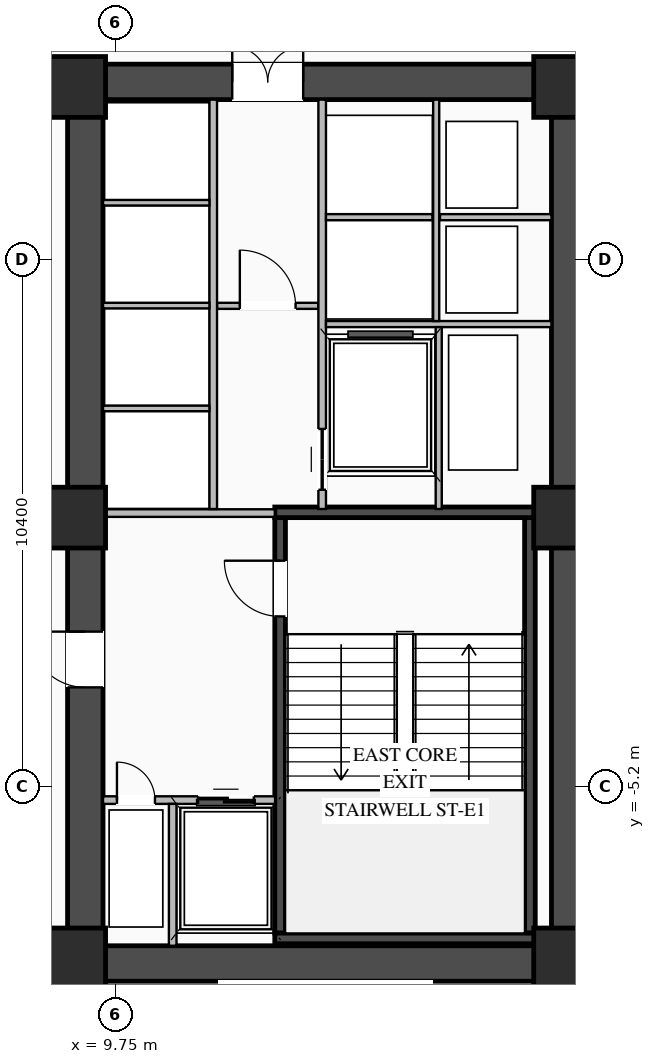
"""IFC4 building model, lengths in metres.
Left out: names, types, materials, properties, quantities, classifications, styles, units other than length and angle.
Written with IfcOpenShell. Run it as: python <this file> out.ifc"""

import sys

from ifc_helpers import new_model, si_unit, direction, frame, frame_2d, origin, origin_2d, place, context, subcontext, project, spatial, rectangle, extrude, element, fill, save


model = new_model("IFC4")
c1 = context("Model", 3, precision=1e-05, world=origin(), true_north=direction((0.0, 1.0)))
c2 = subcontext(c1, "Body", "Model", "MODEL_VIEW")
j1 = project(units=[si_unit("LENGTHUNIT", "METRE"), si_unit("PLANEANGLEUNIT", "RADIAN")], contexts=[c1])
p1 = place(None, origin())
s1 = spatial("IfcSite", under=j1, at=p1, CompositionType="ELEMENT")
p2 = place(p1, origin())
s2 = spatial("IfcBuilding", under=s1, at=p2, CompositionType="ELEMENT")
p3 = place(p2, frame((0.0, 0.0, 5.1)))
s3 = spatial("IfcBuildingStorey", under=s2, at=p3, CompositionType="ELEMENT", Elevation=5.1)
p4 = place(p3, frame((8.8, -8.7, 0.0), z_axis=(0.0, 0.0, 1.0), x_axis=(1.0, 0.0, 0.0)))
e1 = element("IfcWall", 1, at=p4, inside=s3, PredefinedType="SHEAR", context=c2, shape_type="SweptSolid", body=[
    extrude(rectangle(XDim=10.25, YDim=0.7, at=frame_2d((5.125, 0.0))), origin(), (0.0, 0.0, 1.0), 4.25),
])
p5 = place(p3, frame((8.8, 8.7, 0.0), z_axis=(0.0, 0.0, 1.0), x_axis=(1.0, 0.0, 0.0)))
e2 = element("IfcWall", 2, at=p5, inside=s3, PredefinedType="SHEAR", context=c2, shape_type="SweptSolid", body=[
    extrude(rectangle(XDim=10.25, YDim=0.7, at=frame_2d((5.125, 0.0))), origin(), (0.0, 0.0, 1.0), 4.25),
])
p6 = place(p5, frame((3.25, 0.0, 0.0)))
e3 = element("IfcOpeningElement", 3, at=p6, cuts=e2, PredefinedType="OPENING", context=c2, shape_type="SweptSolid", body=[
    extrude(rectangle(XDim=1.4, YDim=2.05, at=frame_2d((0.7, 1.025))), frame((0.0, 0.36, 0.0), z_axis=(0.0, -1.0, 0.0), x_axis=(1.0, 0.0, 0.0)), (0.0, 0.0, 1.0), 0.72),
])
p7 = place(p3, frame((9.15, -8.35, 0.0), z_axis=(0.0, 0.0, 1.0), x_axis=(0.0, 1.0, 0.0)))
e4 = element("IfcWall", 4, at=p7, inside=s3, PredefinedType="SHEAR", context=c2, shape_type="SweptSolid", body=[
    extrude(rectangle(XDim=16.7, YDim=0.7, at=frame_2d((8.35, 0.0))), origin(), (0.0, 0.0, 1.0), 4.25),
])
p8 = place(p7, frame((5.1, 0.0, 0.0)))
e5 = element("IfcOpeningElement", 5, at=p8, cuts=e4, PredefinedType="OPENING", context=c2, shape_type="SweptSolid", body=[
    extrude(rectangle(XDim=1.1, YDim=2.08, at=frame_2d((0.55, 1.04))), frame((0.0, 0.36, 0.0), z_axis=(0.0, -1.0, 0.0), x_axis=(1.0, 0.0, 0.0)), (0.0, 0.0, 1.0), 0.72),
])
p9 = place(p3, frame((18.7, -8.35, 0.0), z_axis=(0.0, 0.0, 1.0), x_axis=(0.0, 1.0, 0.0)))
e6 = element("IfcWall", 6, at=p9, inside=s3, PredefinedType="SHEAR", context=c2, shape_type="SweptSolid", body=[
    extrude(rectangle(XDim=16.7, YDim=0.7, at=frame_2d((8.35, 0.0))), origin(), (0.0, 0.0, 1.0), 4.25),
])
p10 = place(p3, frame((12.995, -8.1, 0.0), z_axis=(0.0, 0.0, 1.0), x_axis=(0.0, 1.0, 0.0)))
e7 = element("IfcWall", 7, at=p10, inside=s3, PredefinedType="SHEAR", context=c2, shape_type="SweptSolid", body=[
    extrude(rectangle(XDim=8.2, YDim=0.21, at=frame_2d((4.1, 0.0))), origin(), (0.0, 0.0, 1.0), 4.25),
])
p11 = place(p10, frame((6.25, 0.0, 0.0)))
e8 = element("IfcOpeningElement", 8, at=p11, cuts=e7, PredefinedType="OPENING", context=c2, shape_type="SweptSolid", body=[
    extrude(rectangle(XDim=1.1, YDim=2.15, at=frame_2d((0.55, 1.075))), frame((0.0, 0.115, 0.0), z_axis=(0.0, -1.0, 0.0), x_axis=(1.0, 0.0, 0.0)), (0.0, 0.0, 1.0), 0.23),
])
p12 = place(p3, frame((17.925, -8.1, 0.0), z_axis=(0.0, 0.0, 1.0), x_axis=(0.0, 1.0, 0.0)))
e9 = element("IfcWall", 9, at=p12, inside=s3, PredefinedType="SHEAR", context=c2, shape_type="SweptSolid", body=[
    extrude(rectangle(XDim=8.2, YDim=0.21, at=frame_2d((4.1, 0.0))), origin(), (0.0, 0.0, 1.0), 4.25),
])
for number, where, z_axis, x_axis in (
    (10, (12.89, -8.205, 0.0), (0.0, 0.0, 1.0), (1.0, 0.0, 0.0)),
    (11, (18.03, 0.205, 0.0), (0.0, 0.0, 1.0), (-1.0, 0.0, 0.0)),
):
    element("IfcWall", number, at=place(p3, frame(where, z_axis=z_axis, x_axis=x_axis)), inside=s3, PredefinedType="SHEAR", context=c2, shape_type="SweptSolid", body=[
        extrude(rectangle(XDim=5.14, YDim=0.21, at=frame_2d((2.57, 0.0))), origin(), (0.0, 0.0, 1.0), 4.25),
    ])
for number, where, z_axis, x_axis in (
    (12, (8.95, -8.6, 0.0), (0.0, 0.0, 1.0), (1.0, 0.0, 0.0)),
    (13, (8.95, 0.1, 0.0), (0.0, 0.0, 1.0), (1.0, 0.0, 0.0)),
    (14, (8.95, 8.6, 0.0), (0.0, 0.0, 1.0), (1.0, 0.0, 0.0)),
    (15, (18.6, -8.6, 0.0), (0.0, 0.0, 1.0), (1.0, 0.0, 0.0)),
    (16, (18.6, 0.1, 0.0), (0.0, 0.0, 1.0), (1.0, 0.0, 0.0)),
    (17, (18.6, 8.6, 0.0), (0.0, 0.0, 1.0), (1.0, 0.0, 0.0)),
):
    element("IfcColumn", number, at=place(p3, frame(where, z_axis=z_axis, x_axis=x_axis)), inside=s3, PredefinedType="COLUMN", context=c2, shape_type="SweptSolid", body=[
        extrude(rectangle(XDim=1.2, YDim=1.2, at=origin_2d()), origin(), (0.0, 0.0, 1.0), 4.5),
    ])
p13 = place(p3, frame((9.5, -5.475, 0.0), z_axis=(0.0, 0.0, 1.0), x_axis=(1.0, 0.0, 0.0)))
e18 = element("IfcWall", 18, at=p13, inside=s3, PredefinedType="STANDARD", context=c2, shape_type="SweptSolid", body=[
    extrude(rectangle(XDim=3.395, YDim=0.15, at=frame_2d((1.698, 0.0))), origin(), (0.0, 0.0, 1.0), 4.23),
])
p14 = place(p13, frame((1.875, 0.0, 0.0)))
e19 = element("IfcOpeningElement", 19, at=p14, cuts=e18, PredefinedType="OPENING", context=c2, shape_type="SweptSolid", body=[
    extrude(rectangle(XDim=1.1, YDim=2.15, at=frame_2d((0.55, 1.075))), frame((0.0, 0.085, 0.0), z_axis=(0.0, -1.0, 0.0), x_axis=(1.0, 0.0, 0.0)), (0.0, 0.0, 1.0), 0.17),
])
p15 = place(p13, frame((0.275, 0.0, 0.0)))
e20 = element("IfcOpeningElement", 20, at=p15, cuts=e18, PredefinedType="OPENING", context=c2, shape_type="SweptSolid", body=[
    extrude(rectangle(XDim=0.75, YDim=2.05, at=frame_2d((0.375, 1.025))), frame((0.0, 0.085, 0.0), z_axis=(0.0, -1.0, 0.0), x_axis=(1.0, 0.0, 0.0)), (0.0, 0.0, 1.0), 0.17),
])
p16 = place(p3, frame((10.875, -8.35, 0.0), z_axis=(0.0, 0.0, 1.0), x_axis=(0.0, 1.0, 0.0)))
e21 = element("IfcWall", 21, at=p16, inside=s3, PredefinedType="STANDARD", context=c2, shape_type="SweptSolid", body=[
    extrude(rectangle(XDim=2.8, YDim=0.15, at=frame_2d((1.4, 0.0))), origin(), (0.0, 0.0, 1.0), 4.23),
])
p17 = place(p3, frame((9.5, 0.19, 0.0), z_axis=(0.0, 0.0, 1.0), x_axis=(1.0, 0.0, 0.0)))
e22 = element("IfcWall", 22, at=p17, inside=s3, PredefinedType="STANDARD", context=c2, shape_type="SweptSolid", body=[
    extrude(rectangle(XDim=3.39, YDim=0.15, at=frame_2d((1.695, 0.0))), origin(), (0.0, 0.0, 1.0), 3.525),
])
p18 = place(p3, frame((11.75, 4.28, 0.0), z_axis=(0.0, 0.0, 1.0), x_axis=(1.0, 0.0, 0.0)))
e23 = element("IfcWall", 23, at=p18, inside=s3, PredefinedType="STANDARD", context=c2, shape_type="SweptSolid", body=[
    extrude(rectangle(XDim=2.0, YDim=0.12, at=frame_2d((1.0, 0.0))), origin(), (0.0, 0.0, 1.0), 4.23),
])
p19 = place(p18, frame((0.45, 0.0, 0.0)))
e24 = element("IfcOpeningElement", 24, at=p19, cuts=e23, PredefinedType="OPENING", context=c2, shape_type="SweptSolid", body=[
    extrude(rectangle(XDim=1.1, YDim=2.1, at=frame_2d((0.55, 1.05))), frame((0.0, 0.07, 0.0), z_axis=(0.0, -1.0, 0.0), x_axis=(1.0, 0.0, 0.0)), (0.0, 0.0, 1.0), 0.14),
])
p20 = place(p3, frame((11.675, 0.27, 0.0), z_axis=(0.0, 0.0, 1.0), x_axis=(0.0, 1.0, 0.0)))
e25 = element("IfcWall", 25, at=p20, inside=s3, PredefinedType="STANDARD", context=c2, shape_type="SweptSolid", body=[
    extrude(rectangle(XDim=8.08, YDim=0.15, at=frame_2d((4.04, 0.0))), origin(), (0.0, 0.0, 1.0), 4.23),
])
for number, where, z_axis, x_axis in (
    (26, (9.5, 2.255, 0.0), (0.0, 0.0, 1.0), (1.0, 0.0, 0.0)),
    (27, (9.5, 4.285, 0.0), (0.0, 0.0, 1.0), (1.0, 0.0, 0.0)),
    (28, (9.5, 6.315, 0.0), (0.0, 0.0, 1.0), (1.0, 0.0, 0.0)),
):
    element("IfcWall", number, at=place(p3, frame(where, z_axis=z_axis, x_axis=x_axis)), inside=s3, PredefinedType="STANDARD", context=c2, shape_type="SweptSolid", body=[
        extrude(rectangle(XDim=2.1, YDim=0.11, at=frame_2d((1.05, 0.0))), origin(), (0.0, 0.0, 1.0), 4.23),
    ])
p21 = place(p3, frame((13.825, 0.27, 0.0), z_axis=(0.0, 0.0, 1.0), x_axis=(0.0, 1.0, 0.0)))
e29 = element("IfcWall", 29, at=p21, inside=s3, PredefinedType="STANDARD", context=c2, shape_type="SweptSolid", body=[
    extrude(rectangle(XDim=8.08, YDim=0.15, at=frame_2d((4.04, 0.0))), origin(), (0.0, 0.0, 1.0), 4.23),
])
p22 = place(p21, frame((0.38, 0.0, 0.0)))
e30 = element("IfcOpeningElement", 30, at=p22, cuts=e29, PredefinedType="OPENING", context=c2, shape_type="SweptSolid", body=[
    extrude(rectangle(XDim=1.2, YDim=2.1, at=frame_2d((0.6, 1.05))), frame((0.0, 0.085, 0.0), z_axis=(0.0, -1.0, 0.0), x_axis=(1.0, 0.0, 0.0)), (0.0, 0.0, 1.0), 0.17),
])
p23 = place(p3, frame((13.9, 3.92, 0.0), z_axis=(0.0, 0.0, 1.0), x_axis=(1.0, 0.0, 0.0)))
e31 = element("IfcWall", 31, at=p23, inside=s3, PredefinedType="STANDARD", context=c2, shape_type="SweptSolid", body=[
    extrude(rectangle(XDim=4.45, YDim=0.12, at=frame_2d((2.225, 0.0))), origin(), (0.0, 0.0, 1.0), 4.23),
])
p24 = place(p3, frame((16.15, 6.03, 0.0), z_axis=(0.0, 0.0, 1.0), x_axis=(1.0, 0.0, 0.0)))
e32 = element("IfcWall", 32, at=p24, inside=s3, PredefinedType="STANDARD", context=c2, shape_type="SweptSolid", body=[
    extrude(rectangle(XDim=2.2, YDim=0.12, at=frame_2d((1.1, 0.0))), origin(), (0.0, 0.0, 1.0), 4.23),
])
p25 = place(p3, frame((16.075, 3.98, 0.0), z_axis=(0.0, 0.0, 1.0), x_axis=(0.0, 1.0, 0.0)))
e33 = element("IfcWall", 33, at=p25, inside=s3, PredefinedType="STANDARD", context=c2, shape_type="SweptSolid", body=[
    extrude(rectangle(XDim=4.37, YDim=0.12, at=frame_2d((2.185, 0.0))), origin(), (0.0, 0.0, 1.0), 4.23),
])
p26 = place(p3, frame((13.9, 6.03, 0.0), z_axis=(0.0, 0.0, 1.0), x_axis=(1.0, 0.0, 0.0)))
e34 = element("IfcWall", 34, at=p26, inside=s3, PredefinedType="STANDARD", context=c2, shape_type="SweptSolid", body=[
    extrude(rectangle(XDim=2.1, YDim=0.12, at=frame_2d((1.05, 0.0))), origin(), (0.0, 0.0, 1.0), 4.23),
])
p27 = place(p3, frame((16.125, 0.27, 0.0), z_axis=(0.0, 0.0, 1.0), x_axis=(0.0, 1.0, 0.0)))
e35 = element("IfcWall", 35, at=p27, inside=s3, PredefinedType="STANDARD", context=c2, shape_type="SweptSolid", body=[
    extrude(rectangle(XDim=3.59, YDim=0.12, at=frame_2d((1.795, 0.0))), origin(), (0.0, 0.0, 1.0), 4.23),
])
p28 = place(p11, origin())
e36 = element("IfcDoor", 36, at=p28, inside=s3, OperationType="SINGLE_SWING_RIGHT", PredefinedType="DOOR", context=c2, shape_type="SweptSolid", body=[
    extrude(rectangle(XDim=1.1, YDim=2.15, at=frame_2d((0.55, 1.075))), frame((0.0, 0.025, 0.0), z_axis=(0.0, -1.0, 0.0), x_axis=(1.0, 0.0, 0.0)), (0.0, 0.0, 1.0), 0.05),
])
fill(e8, e36)
p29 = place(p14, origin())
e37 = element("IfcDoor", 37, at=p29, inside=s3, OperationType="DOUBLE_DOOR_SLIDING", PredefinedType="DOOR", context=c2, shape_type="SweptSolid", body=[
    extrude(rectangle(XDim=1.1, YDim=2.15, at=frame_2d((0.55, 1.075))), frame((0.0, 0.025, 0.0), z_axis=(0.0, -1.0, 0.0), x_axis=(1.0, 0.0, 0.0)), (0.0, 0.0, 1.0), 0.05),
])
fill(e19, e37)
p30 = place(p15, origin())
e38 = element("IfcDoor", 38, at=p30, inside=s3, OperationType="SINGLE_SWING_LEFT", PredefinedType="DOOR", context=c2, shape_type="SweptSolid", body=[
    extrude(rectangle(XDim=0.75, YDim=2.05, at=frame_2d((0.375, 1.025))), frame((0.0, 0.025, 0.0), z_axis=(0.0, -1.0, 0.0), x_axis=(1.0, 0.0, 0.0)), (0.0, 0.0, 1.0), 0.05),
])
fill(e20, e38)
p31 = place(p8, origin())
e39 = element("IfcDoor", 39, at=p31, inside=s3, OperationType="SINGLE_SWING_RIGHT", PredefinedType="DOOR", context=c2, shape_type="SweptSolid", body=[
    extrude(rectangle(XDim=1.1, YDim=2.08, at=frame_2d((0.55, 1.04))), frame((0.0, -0.255, 0.0), z_axis=(0.0, -1.0, 0.0), x_axis=(1.0, 0.0, 0.0)), (0.0, 0.0, 1.0), 0.05),
])
fill(e5, e39)
p32 = place(p19, origin())
e40 = element("IfcDoor", 40, at=p32, inside=s3, OperationType="SINGLE_SWING_LEFT", PredefinedType="DOOR", context=c2, shape_type="SweptSolid", body=[
    extrude(rectangle(XDim=1.1, YDim=2.1, at=frame_2d((0.55, 1.05))), frame((0.0, 0.025, 0.0), z_axis=(0.0, -1.0, 0.0), x_axis=(1.0, 0.0, 0.0)), (0.0, 0.0, 1.0), 0.05),
])
fill(e24, e40)
p33 = place(p6, origin())
e41 = element("IfcDoor", 41, at=p33, inside=s3, OperationType="DOUBLE_DOOR_SINGLE_SWING", PredefinedType="DOOR", context=c2, shape_type="SweptSolid", body=[
    extrude(rectangle(XDim=1.4, YDim=2.05, at=frame_2d((0.7, 1.025))), frame((0.0, 0.295, 0.0), z_axis=(0.0, -1.0, 0.0), x_axis=(1.0, 0.0, 0.0)), (0.0, 0.0, 1.0), 0.05),
])
fill(e3, e41)
p34 = place(p22, origin())
e42 = element("IfcDoor", 42, at=p34, inside=s3, OperationType="DOUBLE_DOOR_SLIDING", PredefinedType="DOOR", context=c2, shape_type="SweptSolid", body=[
    extrude(rectangle(XDim=1.2, YDim=2.1, at=frame_2d((0.6, 1.05))), frame((0.0, 0.025, 0.0), z_axis=(0.0, -1.0, 0.0), x_axis=(1.0, 0.0, 0.0)), (0.0, 0.0, 1.0), 0.05),
])
fill(e30, e42)
save(model, sys.argv[1])
